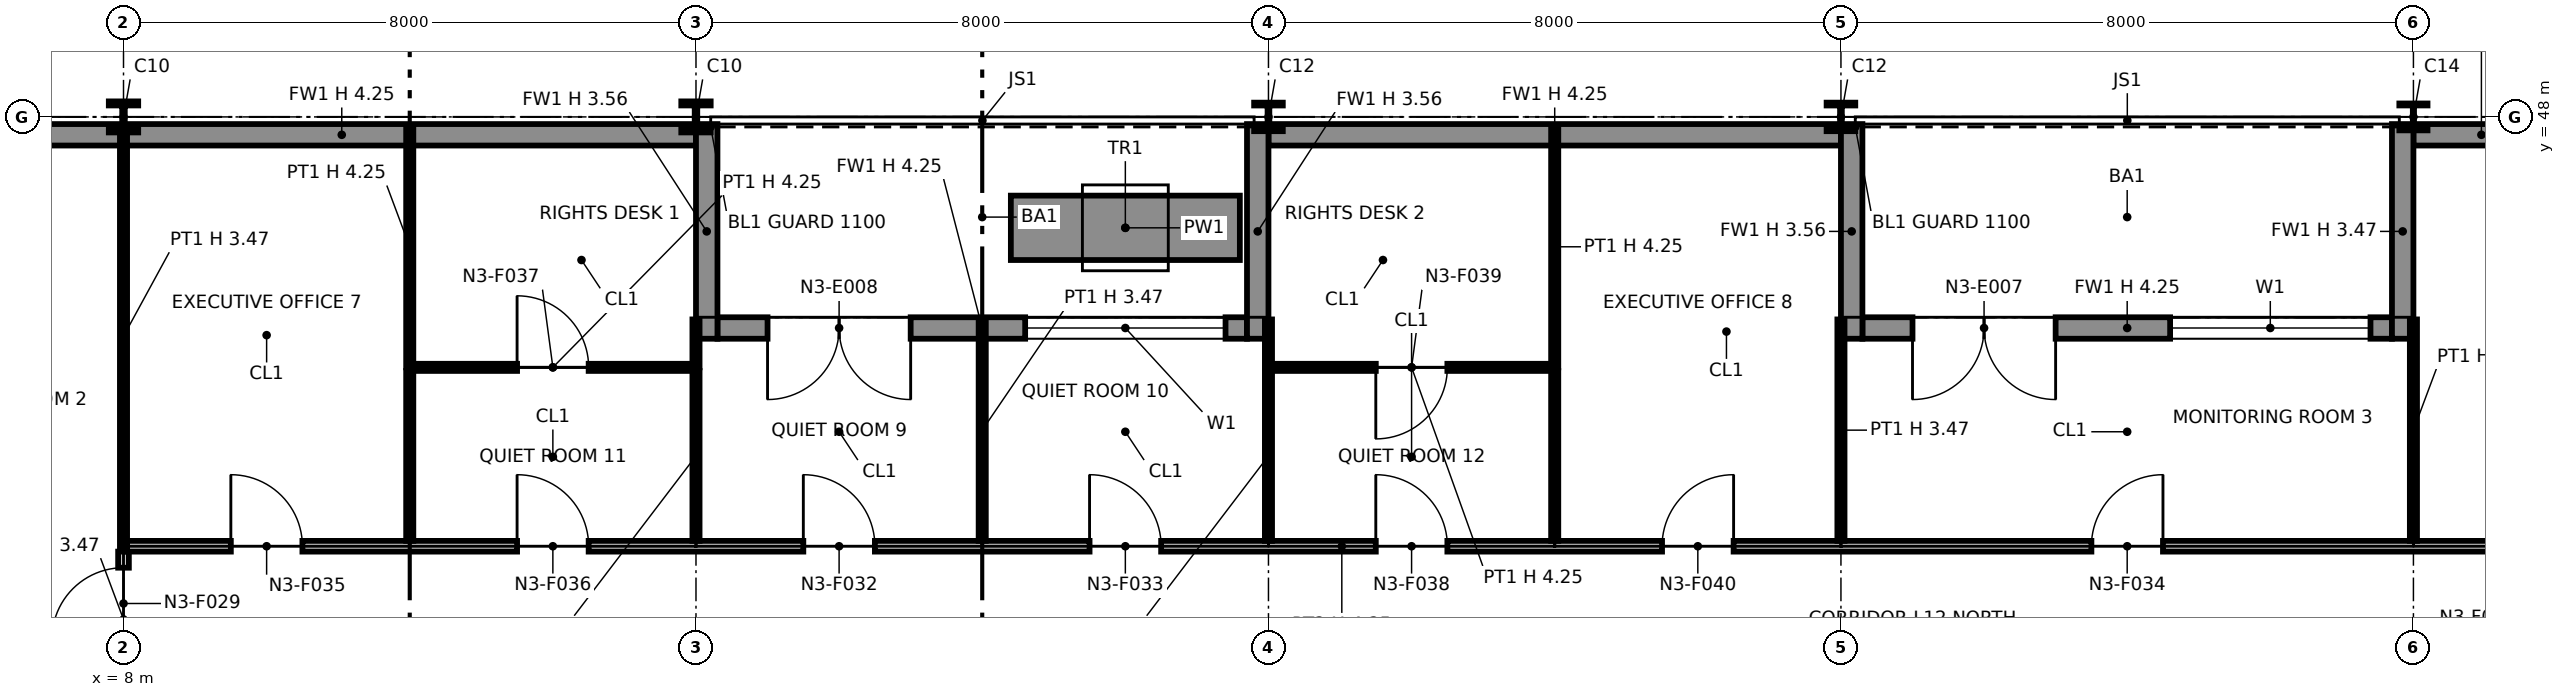
"""IFC4 building model, lengths in metres.
Left out: names, types, materials, properties, quantities, classifications, styles, units other than length and angle.
Written with IfcOpenShell. Run it as: python <this file> out.ifc"""

import sys

from ifc_helpers import new_model, si_unit, direction, frame, frame_2d, origin, origin_2d, place, context, subcontext, project, spatial, rectangle, i_section, extrude, element, fill, save


model = new_model("IFC4")
c1 = context("Model", 3, precision=1e-05, world=origin(), true_north=direction((0.0, 1.0)))
c2 = subcontext(c1, "Body", "Model", "MODEL_VIEW")
j1 = project(units=[si_unit("LENGTHUNIT", "METRE"), si_unit("PLANEANGLEUNIT", "RADIAN")], contexts=[c1])
p1 = place(None, origin())
s1 = spatial("IfcSite", under=j1, at=p1, CompositionType="ELEMENT")
p2 = place(p1, origin())
s2 = spatial("IfcBuilding", under=s1, at=p2, CompositionType="ELEMENT")
p3 = place(p2, frame((0.0, 0.0, 70.0)))
s3 = spatial("IfcBuildingStorey", under=s2, at=p3, CompositionType="ELEMENT", Elevation=70.0)
for number, where, z_axis, x_axis in (
    (1, (8.0, 48.0, 0.0), (0.0, 0.0, 1.0), (1.0, 0.0, 0.0)),
    (2, (16.0, 48.0, 0.0), (0.0, 0.0, 1.0), (1.0, 0.0, 0.0)),
):
    element("IfcColumn", number, at=place(p3, frame(where, z_axis=z_axis, x_axis=x_axis)), inside=s3, PredefinedType="COLUMN", context=c2, shape_type="SweptSolid", body=[
        extrude(i_section(OverallWidth=0.411, OverallDepth=0.434, WebThickness=0.036, FlangeThickness=0.057, at=origin_2d()), origin(), (0.0, 0.0, 1.0), 4.25),
    ])
for number, where, z_axis, x_axis in (
    (3, (24.0, 48.0, 0.0), (0.0, 0.0, 1.0), (1.0, 0.0, 0.0)),
    (4, (32.0, 48.0, 0.0), (0.0, 0.0, 1.0), (1.0, 0.0, 0.0)),
):
    element("IfcColumn", number, at=place(p3, frame(where, z_axis=z_axis, x_axis=x_axis)), inside=s3, PredefinedType="COLUMN", context=c2, shape_type="SweptSolid", body=[
        extrude(i_section(OverallWidth=0.401, OverallDepth=0.399, WebThickness=0.025, FlangeThickness=0.04, at=origin_2d()), origin(), (0.0, 0.0, 1.0), 4.25),
    ])
p4 = place(p3, frame((40.0, 48.0, 0.0), z_axis=(0.0, 0.0, 1.0), x_axis=(1.0, 0.0, 0.0)))
e5 = element("IfcColumn", 5, at=p4, inside=s3, PredefinedType="COLUMN", context=c2, shape_type="SweptSolid", body=[
    extrude(i_section(OverallWidth=0.394, OverallDepth=0.376, WebThickness=0.017, FlangeThickness=0.028, at=origin_2d()), origin(), (0.0, 0.0, 1.0), 4.25),
])
p5 = place(p3, frame((41.9, 47.75, 0.0), z_axis=(0.0, 0.0, 1.0), x_axis=(-1.0, 0.0, 0.0)))
e6 = element("IfcWall", 6, at=p5, inside=s3, PredefinedType="SOLIDWALL", context=c2, shape_type="SweptSolid", body=[
    extrude(rectangle(XDim=1.9, YDim=0.3, at=frame_2d((0.95, 0.0))), origin(), (0.0, 0.0, 1.0), 4.25),
])
p6 = place(p3, frame((39.7, 45.05, 0.0), z_axis=(0.0, 0.0, 1.0), x_axis=(-1.0, 0.0, 0.0)))
e7 = element("IfcWall", 7, at=p6, inside=s3, PredefinedType="SOLIDWALL", context=c2, shape_type="SweptSolid", body=[
    extrude(rectangle(XDim=7.4, YDim=0.3, at=frame_2d((3.7, 0.0))), origin(), (0.0, 0.0, 1.0), 4.25),
])
p7 = place(p6, frame((0.3, 0.0, 0.9)))
e8 = element("IfcOpeningElement", 8, at=p7, cuts=e7, PredefinedType="OPENING", context=c2, shape_type="SweptSolid", body=[
    extrude(rectangle(XDim=2.8, YDim=2.2, at=frame_2d((1.4, 1.1))), frame((0.0, 0.16, 0.0), z_axis=(0.0, -1.0, 0.0), x_axis=(1.0, 0.0, 0.0)), (0.0, 0.0, 1.0), 0.32),
])
p8 = place(p6, frame((4.7, 0.0, 0.0)))
e9 = element("IfcOpeningElement", 9, at=p8, cuts=e7, PredefinedType="OPENING", context=c2, shape_type="SweptSolid", body=[
    extrude(rectangle(XDim=2.0, YDim=2.4, at=frame_2d((1.0, 1.2))), frame((0.0, 0.16, 0.0), z_axis=(0.0, -1.0, 0.0), x_axis=(1.0, 0.0, 0.0)), (0.0, 0.0, 1.0), 0.32),
])
p9 = place(p3, frame((39.85, 47.9, 0.0), z_axis=(0.0, 0.0, 1.0), x_axis=(0.0, -1.0, 0.0)))
e10 = element("IfcWall", 10, at=p9, inside=s3, PredefinedType="SOLIDWALL", context=c2, shape_type="SweptSolid", body=[
    extrude(rectangle(XDim=3.0, YDim=0.3, at=frame_2d((1.5, 0.0))), origin(), (0.0, 0.0, 1.0), 3.469),
])
p10 = place(p3, frame((32.15, 47.9, 0.0), z_axis=(0.0, 0.0, 1.0), x_axis=(0.0, -1.0, 0.0)))
e11 = element("IfcWall", 11, at=p10, inside=s3, PredefinedType="SOLIDWALL", context=c2, shape_type="SweptSolid", body=[
    extrude(rectangle(XDim=3.0, YDim=0.3, at=frame_2d((1.5, 0.0))), origin(), (0.0, 0.0, 1.0), 3.556),
])
p11 = place(p3, frame((32.0, 47.75, 0.0), z_axis=(0.0, 0.0, 1.0), x_axis=(-1.0, 0.0, 0.0)))
e12 = element("IfcWall", 12, at=p11, inside=s3, PredefinedType="SOLIDWALL", context=c2, shape_type="SweptSolid", body=[
    extrude(rectangle(XDim=8.0, YDim=0.3, at=frame_2d((4.0, 0.0))), origin(), (0.0, 0.0, 1.0), 4.25),
])
p12 = place(p3, frame((23.7, 45.05, 0.0), z_axis=(0.0, 0.0, 1.0), x_axis=(-1.0, 0.0, 0.0)))
e13 = element("IfcWall", 13, at=p12, inside=s3, PredefinedType="SOLIDWALL", context=c2, shape_type="SweptSolid", body=[
    extrude(rectangle(XDim=7.4, YDim=0.3, at=frame_2d((3.7, 0.0))), origin(), (0.0, 0.0, 1.0), 4.25),
])
p13 = place(p12, frame((0.3, 0.0, 0.9)))
e14 = element("IfcOpeningElement", 14, at=p13, cuts=e13, PredefinedType="OPENING", context=c2, shape_type="SweptSolid", body=[
    extrude(rectangle(XDim=2.8, YDim=2.2, at=frame_2d((1.4, 1.1))), frame((0.0, 0.16, 0.0), z_axis=(0.0, -1.0, 0.0), x_axis=(1.0, 0.0, 0.0)), (0.0, 0.0, 1.0), 0.32),
])
p14 = place(p12, frame((4.7, 0.0, 0.0)))
e15 = element("IfcOpeningElement", 15, at=p14, cuts=e13, PredefinedType="OPENING", context=c2, shape_type="SweptSolid", body=[
    extrude(rectangle(XDim=2.0, YDim=2.4, at=frame_2d((1.0, 1.2))), frame((0.0, 0.16, 0.0), z_axis=(0.0, -1.0, 0.0), x_axis=(1.0, 0.0, 0.0)), (0.0, 0.0, 1.0), 0.32),
])
for number, where, z_axis, x_axis in (
    (16, (23.85, 47.9, 0.0), (0.0, 0.0, 1.0), (0.0, -1.0, 0.0)),
    (17, (16.15, 47.9, 0.0), (0.0, 0.0, 1.0), (0.0, -1.0, 0.0)),
):
    element("IfcWall", number, at=place(p3, frame(where, z_axis=z_axis, x_axis=x_axis)), inside=s3, PredefinedType="SOLIDWALL", context=c2, shape_type="SweptSolid", body=[
        extrude(rectangle(XDim=3.0, YDim=0.3, at=frame_2d((1.5, 0.0))), origin(), (0.0, 0.0, 1.0), 3.556),
    ])
p15 = place(p3, frame((16.0, 47.75, 0.0), z_axis=(0.0, 0.0, 1.0), x_axis=(-1.0, 0.0, 0.0)))
e18 = element("IfcWall", 18, at=p15, inside=s3, PredefinedType="SOLIDWALL", context=c2, shape_type="SweptSolid", body=[
    extrude(rectangle(XDim=9.9, YDim=0.3, at=frame_2d((4.95, 0.0))), origin(), (0.0, 0.0, 1.0), 4.25),
])
p16 = place(p3, frame((23.6, 46.45, 0.0), z_axis=(0.0, 0.0, 1.0), x_axis=(-1.0, 0.0, 0.0)))
e19 = element("IfcWall", 19, at=p16, inside=s3, PredefinedType="SOLIDWALL", context=c2, shape_type="SweptSolid", body=[
    extrude(rectangle(XDim=3.2, YDim=0.9, at=frame_2d((1.6, 0.0))), origin(), (0.0, 0.0, 1.0), 0.6),
])
p17 = place(p3, frame((8.0, 40.03, 0.0), z_axis=(0.0, 0.0, 1.0), x_axis=(0.0, 1.0, 0.0)))
e20 = element("IfcWall", 20, at=p17, inside=s3, PredefinedType="PARTITIONING", context=c2, shape_type="SweptSolid", body=[
    extrude(rectangle(XDim=1.895, YDim=0.15, at=frame_2d((0.948, 0.0))), origin(), (0.0, 0.0, 1.0), 3.47),
])
p18 = place(p17, frame((0.67, 0.0, 0.0)))
e21 = element("IfcOpeningElement", 21, at=p18, cuts=e20, PredefinedType="OPENING", context=c2, shape_type="SweptSolid", body=[
    extrude(rectangle(XDim=1.0, YDim=2.1, at=frame_2d((0.5, 1.05))), frame((0.0, 0.085, 0.0), z_axis=(0.0, -1.0, 0.0), x_axis=(1.0, 0.0, 0.0)), (0.0, 0.0, 1.0), 0.17),
])
p19 = place(p3, frame((8.05, 42.0, 0.0), z_axis=(0.0, 0.0, 1.0), x_axis=(1.0, 0.0, 0.0)))
e22 = element("IfcWall", 22, at=p19, inside=s3, PredefinedType="PARTITIONING", context=c2, shape_type="SweptSolid", body=[
    extrude(rectangle(XDim=33.95, YDim=0.15, at=frame_2d((16.975, 0.0))), origin(), (0.0, 0.0, 1.0), 4.25),
])
p20 = place(p19, frame((9.45, 0.0, 0.0)))
e23 = element("IfcOpeningElement", 23, at=p20, cuts=e22, PredefinedType="OPENING", context=c2, shape_type="SweptSolid", body=[
    extrude(rectangle(XDim=1.0, YDim=2.1, at=frame_2d((0.5, 1.05))), frame((0.0, 0.085, 0.0), z_axis=(0.0, -1.0, 0.0), x_axis=(1.0, 0.0, 0.0)), (0.0, 0.0, 1.0), 0.17),
])
p21 = place(p19, frame((13.45, 0.0, 0.0)))
e24 = element("IfcOpeningElement", 24, at=p21, cuts=e22, PredefinedType="OPENING", context=c2, shape_type="SweptSolid", body=[
    extrude(rectangle(XDim=1.0, YDim=2.1, at=frame_2d((0.5, 1.05))), frame((0.0, 0.085, 0.0), z_axis=(0.0, -1.0, 0.0), x_axis=(1.0, 0.0, 0.0)), (0.0, 0.0, 1.0), 0.17),
])
p22 = place(p19, frame((27.45, 0.0, 0.0)))
e25 = element("IfcOpeningElement", 25, at=p22, cuts=e22, PredefinedType="OPENING", context=c2, shape_type="SweptSolid", body=[
    extrude(rectangle(XDim=1.0, YDim=2.1, at=frame_2d((0.5, 1.05))), frame((0.0, 0.085, 0.0), z_axis=(0.0, -1.0, 0.0), x_axis=(1.0, 0.0, 0.0)), (0.0, 0.0, 1.0), 0.17),
])
p23 = place(p19, frame((1.45, 0.0, 0.0)))
e26 = element("IfcOpeningElement", 26, at=p23, cuts=e22, PredefinedType="OPENING", context=c2, shape_type="SweptSolid", body=[
    extrude(rectangle(XDim=1.0, YDim=2.1, at=frame_2d((0.5, 1.05))), frame((0.0, 0.085, 0.0), z_axis=(0.0, -1.0, 0.0), x_axis=(1.0, 0.0, 0.0)), (0.0, 0.0, 1.0), 0.17),
])
p24 = place(p19, frame((5.45, 0.0, 0.0)))
e27 = element("IfcOpeningElement", 27, at=p24, cuts=e22, PredefinedType="OPENING", context=c2, shape_type="SweptSolid", body=[
    extrude(rectangle(XDim=1.0, YDim=2.1, at=frame_2d((0.5, 1.05))), frame((0.0, 0.085, 0.0), z_axis=(0.0, -1.0, 0.0), x_axis=(1.0, 0.0, 0.0)), (0.0, 0.0, 1.0), 0.17),
])
p25 = place(p19, frame((17.45, 0.0, 0.0)))
e28 = element("IfcOpeningElement", 28, at=p25, cuts=e22, PredefinedType="OPENING", context=c2, shape_type="SweptSolid", body=[
    extrude(rectangle(XDim=1.0, YDim=2.1, at=frame_2d((0.5, 1.05))), frame((0.0, 0.085, 0.0), z_axis=(0.0, -1.0, 0.0), x_axis=(1.0, 0.0, 0.0)), (0.0, 0.0, 1.0), 0.17),
])
p26 = place(p19, frame((21.45, 0.0, 0.0)))
e29 = element("IfcOpeningElement", 29, at=p26, cuts=e22, PredefinedType="OPENING", context=c2, shape_type="SweptSolid", body=[
    extrude(rectangle(XDim=1.0, YDim=2.1, at=frame_2d((0.5, 1.05))), frame((0.0, 0.085, 0.0), z_axis=(0.0, -1.0, 0.0), x_axis=(1.0, 0.0, 0.0)), (0.0, 0.0, 1.0), 0.17),
])
p27 = place(p3, frame((8.0, 42.0, 0.0), z_axis=(0.0, 0.0, 1.0), x_axis=(0.0, 1.0, 0.0)))
e30 = element("IfcWall", 30, at=p27, inside=s3, PredefinedType="PARTITIONING", context=c2, shape_type="SweptSolid", body=[
    extrude(rectangle(XDim=5.87, YDim=0.1, at=frame_2d((2.935, 0.0))), origin(), (0.0, 0.0, 1.0), 3.47),
])
for number, where, z_axis, x_axis in (
    (31, (12.0, 42.075, 0.0), (0.0, 0.0, 1.0), (0.0, 1.0, 0.0)),
    (32, (16.0, 42.075, 0.0), (0.0, 0.0, 1.0), (0.0, 1.0, 0.0)),
):
    element("IfcWall", number, at=place(p3, frame(where, z_axis=z_axis, x_axis=x_axis)), inside=s3, PredefinedType="PARTITIONING", context=c2, shape_type="SweptSolid", body=[
        extrude(rectangle(XDim=2.375, YDim=0.1, at=frame_2d((1.188, 0.0))), origin(), (0.0, 0.0, 1.0), 3.47),
    ])
p28 = place(p3, frame((20.0, 42.075, 0.0), z_axis=(0.0, 0.0, 1.0), x_axis=(0.0, 1.0, 0.0)))
e33 = element("IfcWall", 33, at=p28, inside=s3, PredefinedType="PARTITIONING", context=c2, shape_type="SweptSolid", body=[
    extrude(rectangle(XDim=3.095, YDim=0.1, at=frame_2d((1.547, 0.0))), origin(), (0.0, 0.0, 1.0), 3.47),
])
for number, where, z_axis, x_axis in (
    (34, (24.0, 42.075, 0.0), (0.0, 0.0, 1.0), (0.0, 1.0, 0.0)),
    (35, (28.0, 42.075, 0.0), (0.0, 0.0, 1.0), (0.0, 1.0, 0.0)),
):
    element("IfcWall", number, at=place(p3, frame(where, z_axis=z_axis, x_axis=x_axis)), inside=s3, PredefinedType="PARTITIONING", context=c2, shape_type="SweptSolid", body=[
        extrude(rectangle(XDim=2.375, YDim=0.1, at=frame_2d((1.188, 0.0))), origin(), (0.0, 0.0, 1.0), 3.47),
    ])
for number, where, z_axis, x_axis in (
    (36, (32.0, 42.075, 0.0), (0.0, 0.0, 1.0), (0.0, 1.0, 0.0)),
    (37, (40.0, 42.075, 0.0), (0.0, 0.0, 1.0), (0.0, 1.0, 0.0)),
):
    element("IfcWall", number, at=place(p3, frame(where, z_axis=z_axis, x_axis=x_axis)), inside=s3, PredefinedType="PARTITIONING", context=c2, shape_type="SweptSolid", body=[
        extrude(rectangle(XDim=3.095, YDim=0.1, at=frame_2d((1.547, 0.0))), origin(), (0.0, 0.0, 1.0), 3.47),
    ])
p29 = place(p3, frame((12.05, 44.5, 0.0), z_axis=(0.0, 0.0, 1.0), x_axis=(1.0, 0.0, 0.0)))
e38 = element("IfcWall", 38, at=p29, inside=s3, PredefinedType="PARTITIONING", context=c2, shape_type="SweptSolid", body=[
    extrude(rectangle(XDim=3.9, YDim=0.1, at=frame_2d((1.95, 0.0))), origin(), (0.0, 0.0, 1.0), 4.25),
])
p30 = place(p29, frame((1.45, 0.0, 0.0)))
e39 = element("IfcOpeningElement", 39, at=p30, cuts=e38, PredefinedType="OPENING", context=c2, shape_type="SweptSolid", body=[
    extrude(rectangle(XDim=1.0, YDim=2.1, at=frame_2d((0.5, 1.05))), frame((0.0, 0.06, 0.0), z_axis=(0.0, -1.0, 0.0), x_axis=(1.0, 0.0, 0.0)), (0.0, 0.0, 1.0), 0.12),
])
p31 = place(p3, frame((12.0, 44.5, 0.0), z_axis=(0.0, 0.0, 1.0), x_axis=(0.0, 1.0, 0.0)))
e40 = element("IfcWall", 40, at=p31, inside=s3, PredefinedType="PARTITIONING", context=c2, shape_type="SweptSolid", body=[
    extrude(rectangle(XDim=3.37, YDim=0.1, at=frame_2d((1.685, 0.0))), origin(), (0.0, 0.0, 1.0), 4.25),
])
p32 = place(p3, frame((16.0, 44.5, 0.0), z_axis=(0.0, 0.0, 1.0), x_axis=(0.0, 1.0, 0.0)))
e41 = element("IfcWall", 41, at=p32, inside=s3, PredefinedType="PARTITIONING", context=c2, shape_type="SweptSolid", body=[
    extrude(rectangle(XDim=0.67, YDim=0.1, at=frame_2d((0.335, 0.0))), origin(), (0.0, 0.0, 1.0), 3.47),
])
p33 = place(p3, frame((24.05, 44.5, 0.0), z_axis=(0.0, 0.0, 1.0), x_axis=(1.0, 0.0, 0.0)))
e42 = element("IfcWall", 42, at=p33, inside=s3, PredefinedType="PARTITIONING", context=c2, shape_type="SweptSolid", body=[
    extrude(rectangle(XDim=3.9, YDim=0.1, at=frame_2d((1.95, 0.0))), origin(), (0.0, 0.0, 1.0), 4.25),
])
p34 = place(p33, frame((2.45, 0.0, 0.0), z_axis=(0.0, 0.0, 1.0), x_axis=(-1.0, 0.0, 0.0)))
e43 = element("IfcOpeningElement", 43, at=p34, cuts=e42, PredefinedType="OPENING", context=c2, shape_type="SweptSolid", body=[
    extrude(rectangle(XDim=1.0, YDim=2.1, at=frame_2d((0.5, 1.05))), frame((0.0, 0.06, 0.0), z_axis=(0.0, -1.0, 0.0), x_axis=(1.0, 0.0, 0.0)), (0.0, 0.0, 1.0), 0.12),
])
p35 = place(p3, frame((24.0, 44.5, 0.0), z_axis=(0.0, 0.0, 1.0), x_axis=(0.0, 1.0, 0.0)))
e44 = element("IfcWall", 44, at=p35, inside=s3, PredefinedType="PARTITIONING", context=c2, shape_type="SweptSolid", body=[
    extrude(rectangle(XDim=0.67, YDim=0.1, at=frame_2d((0.335, 0.0))), origin(), (0.0, 0.0, 1.0), 3.47),
])
p36 = place(p3, frame((28.0, 44.5, 0.0), z_axis=(0.0, 0.0, 1.0), x_axis=(0.0, 1.0, 0.0)))
e45 = element("IfcWall", 45, at=p36, inside=s3, PredefinedType="PARTITIONING", context=c2, shape_type="SweptSolid", body=[
    extrude(rectangle(XDim=3.37, YDim=0.1, at=frame_2d((1.685, 0.0))), origin(), (0.0, 0.0, 1.0), 4.25),
])
p37 = place(p7, origin())
e46 = element("IfcWindow", 46, at=p37, inside=s3, PartitioningType="SINGLE_PANEL", PredefinedType="WINDOW", context=c2, shape_type="SweptSolid", body=[
    extrude(rectangle(XDim=2.8, YDim=2.2, at=frame_2d((1.4, 1.1))), frame((0.0, 0.03, 0.0), z_axis=(0.0, -1.0, 0.0), x_axis=(1.0, 0.0, 0.0)), (0.0, 0.0, 1.0), 0.06),
])
fill(e8, e46)
p38 = place(p8, origin())
e47 = element("IfcDoor", 47, at=p38, inside=s3, OperationType="DOUBLE_DOOR_SINGLE_SWING", PredefinedType="DOOR", context=c2, shape_type="SweptSolid", body=[
    extrude(rectangle(XDim=2.0, YDim=2.4, at=frame_2d((1.0, 1.2))), frame((0.0, 0.025, 0.0), z_axis=(0.0, -1.0, 0.0), x_axis=(1.0, 0.0, 0.0)), (0.0, 0.0, 1.0), 0.05),
])
fill(e9, e47)
p39 = place(p13, origin())
e48 = element("IfcWindow", 48, at=p39, inside=s3, PartitioningType="SINGLE_PANEL", PredefinedType="WINDOW", context=c2, shape_type="SweptSolid", body=[
    extrude(rectangle(XDim=2.8, YDim=2.2, at=frame_2d((1.4, 1.1))), frame((0.0, 0.03, 0.0), z_axis=(0.0, -1.0, 0.0), x_axis=(1.0, 0.0, 0.0)), (0.0, 0.0, 1.0), 0.06),
])
fill(e14, e48)
p40 = place(p14, origin())
e49 = element("IfcDoor", 49, at=p40, inside=s3, OperationType="DOUBLE_DOOR_SINGLE_SWING", PredefinedType="DOOR", context=c2, shape_type="SweptSolid", body=[
    extrude(rectangle(XDim=2.0, YDim=2.4, at=frame_2d((1.0, 1.2))), frame((0.0, 0.025, 0.0), z_axis=(0.0, -1.0, 0.0), x_axis=(1.0, 0.0, 0.0)), (0.0, 0.0, 1.0), 0.05),
])
fill(e15, e49)
p41 = place(p18, origin())
e50 = element("IfcDoor", 50, at=p41, inside=s3, OperationType="SINGLE_SWING_LEFT", PredefinedType="DOOR", context=c2, shape_type="SweptSolid", body=[
    extrude(rectangle(XDim=1.0, YDim=2.1, at=frame_2d((0.5, 1.05))), frame((0.0, 0.025, 0.0), z_axis=(0.0, -1.0, 0.0), x_axis=(1.0, 0.0, 0.0)), (0.0, 0.0, 1.0), 0.05),
])
fill(e21, e50)
p42 = place(p20, origin())
e51 = element("IfcDoor", 51, at=p42, inside=s3, OperationType="SINGLE_SWING_LEFT", PredefinedType="DOOR", context=c2, shape_type="SweptSolid", body=[
    extrude(rectangle(XDim=1.0, YDim=2.1, at=frame_2d((0.5, 1.05))), frame((0.0, 0.025, 0.0), z_axis=(0.0, -1.0, 0.0), x_axis=(1.0, 0.0, 0.0)), (0.0, 0.0, 1.0), 0.05),
])
fill(e23, e51)
p43 = place(p21, origin())
e52 = element("IfcDoor", 52, at=p43, inside=s3, OperationType="SINGLE_SWING_LEFT", PredefinedType="DOOR", context=c2, shape_type="SweptSolid", body=[
    extrude(rectangle(XDim=1.0, YDim=2.1, at=frame_2d((0.5, 1.05))), frame((0.0, 0.025, 0.0), z_axis=(0.0, -1.0, 0.0), x_axis=(1.0, 0.0, 0.0)), (0.0, 0.0, 1.0), 0.05),
])
fill(e24, e52)
p44 = place(p22, origin())
e53 = element("IfcDoor", 53, at=p44, inside=s3, OperationType="SINGLE_SWING_RIGHT", PredefinedType="DOOR", context=c2, shape_type="SweptSolid", body=[
    extrude(rectangle(XDim=1.0, YDim=2.1, at=frame_2d((0.5, 1.05))), frame((0.0, 0.025, 0.0), z_axis=(0.0, -1.0, 0.0), x_axis=(1.0, 0.0, 0.0)), (0.0, 0.0, 1.0), 0.05),
])
fill(e25, e53)
p45 = place(p23, origin())
e54 = element("IfcDoor", 54, at=p45, inside=s3, OperationType="SINGLE_SWING_LEFT", PredefinedType="DOOR", context=c2, shape_type="SweptSolid", body=[
    extrude(rectangle(XDim=1.0, YDim=2.1, at=frame_2d((0.5, 1.05))), frame((0.0, 0.025, 0.0), z_axis=(0.0, -1.0, 0.0), x_axis=(1.0, 0.0, 0.0)), (0.0, 0.0, 1.0), 0.05),
])
fill(e26, e54)
p46 = place(p24, origin())
e55 = element("IfcDoor", 55, at=p46, inside=s3, OperationType="SINGLE_SWING_LEFT", PredefinedType="DOOR", context=c2, shape_type="SweptSolid", body=[
    extrude(rectangle(XDim=1.0, YDim=2.1, at=frame_2d((0.5, 1.05))), frame((0.0, 0.025, 0.0), z_axis=(0.0, -1.0, 0.0), x_axis=(1.0, 0.0, 0.0)), (0.0, 0.0, 1.0), 0.05),
])
fill(e27, e55)
p47 = place(p30, origin())
e56 = element("IfcDoor", 56, at=p47, inside=s3, OperationType="SINGLE_SWING_LEFT", PredefinedType="DOOR", context=c2, shape_type="SweptSolid", body=[
    extrude(rectangle(XDim=1.0, YDim=2.1, at=frame_2d((0.5, 1.05))), frame((0.0, 0.025, 0.0), z_axis=(0.0, -1.0, 0.0), x_axis=(1.0, 0.0, 0.0)), (0.0, 0.0, 1.0), 0.05),
])
fill(e39, e56)
p48 = place(p25, origin())
e57 = element("IfcDoor", 57, at=p48, inside=s3, OperationType="SINGLE_SWING_LEFT", PredefinedType="DOOR", context=c2, shape_type="SweptSolid", body=[
    extrude(rectangle(XDim=1.0, YDim=2.1, at=frame_2d((0.5, 1.05))), frame((0.0, 0.025, 0.0), z_axis=(0.0, -1.0, 0.0), x_axis=(1.0, 0.0, 0.0)), (0.0, 0.0, 1.0), 0.05),
])
fill(e28, e57)
p49 = place(p34, origin())
e58 = element("IfcDoor", 58, at=p49, inside=s3, OperationType="SINGLE_SWING_RIGHT", PredefinedType="DOOR", context=c2, shape_type="SweptSolid", body=[
    extrude(rectangle(XDim=1.0, YDim=2.1, at=frame_2d((0.5, 1.05))), frame((0.0, 0.025, 0.0), z_axis=(0.0, -1.0, 0.0), x_axis=(1.0, 0.0, 0.0)), (0.0, 0.0, 1.0), 0.05),
])
fill(e43, e58)
p50 = place(p26, origin())
e59 = element("IfcDoor", 59, at=p50, inside=s3, OperationType="SINGLE_SWING_RIGHT", PredefinedType="DOOR", context=c2, shape_type="SweptSolid", body=[
    extrude(rectangle(XDim=1.0, YDim=2.1, at=frame_2d((0.5, 1.05))), frame((0.0, 0.025, 0.0), z_axis=(0.0, -1.0, 0.0), x_axis=(1.0, 0.0, 0.0)), (0.0, 0.0, 1.0), 0.05),
])
fill(e29, e59)
save(model, sys.argv[1])
